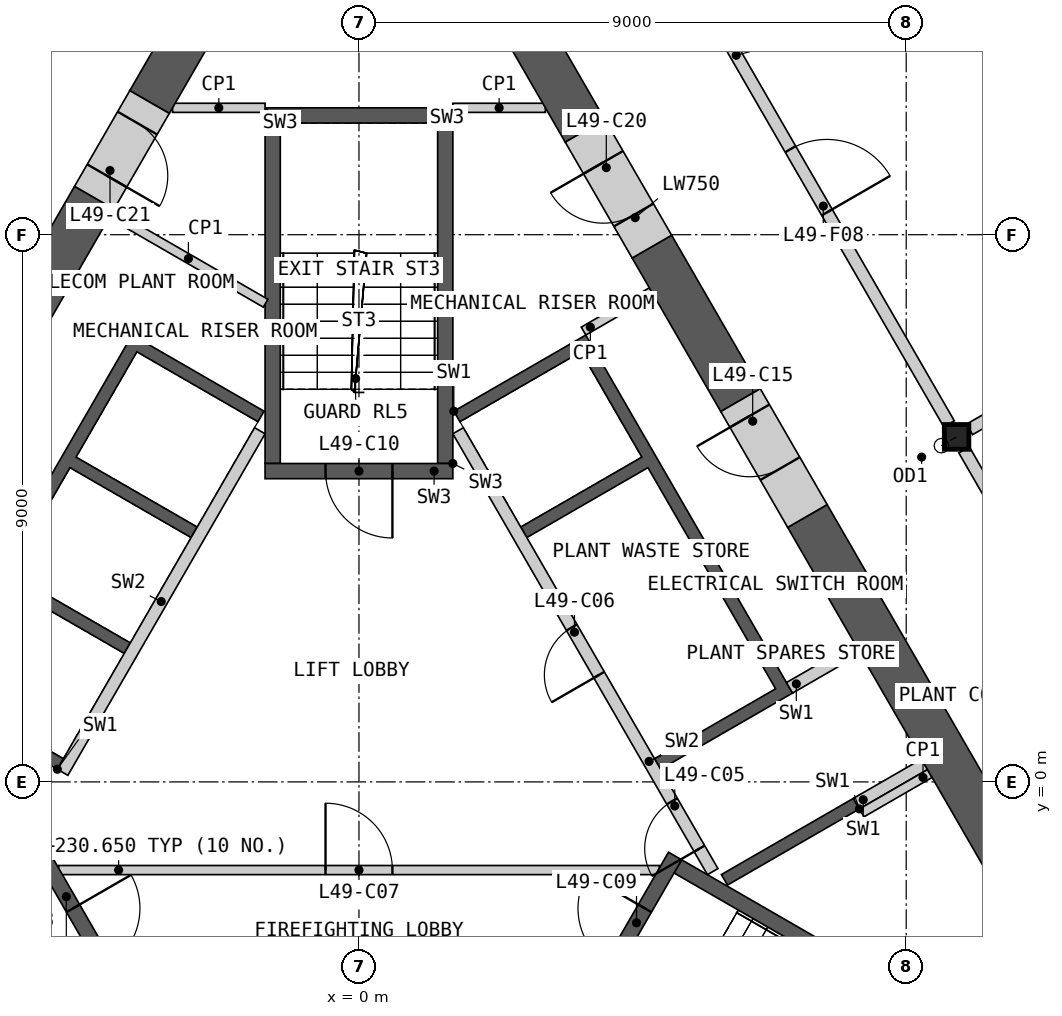
"""IFC4 building model, lengths in metres.
Left out: names, types, materials, properties, quantities, classifications, styles, units other than length and angle.
Written with IfcOpenShell. Run it as: python <this file> out.ifc"""

import sys

from ifc_helpers import new_model, si_unit, direction, frame, frame_2d, origin, origin_2d, place, context, subcontext, project, spatial, polyline, rectangle, i_section, outline, extrude, element, fill, save


model = new_model("IFC4")
c1 = context("Model", 3, precision=1e-05, world=origin(), true_north=direction((0.0, 1.0)))
c2 = subcontext(c1, "Body", "Model", "MODEL_VIEW")
j1 = project(units=[si_unit("LENGTHUNIT", "METRE"), si_unit("PLANEANGLEUNIT", "RADIAN")], contexts=[c1])
p1 = place(None, origin())
s1 = spatial("IfcSite", under=j1, at=p1, CompositionType="ELEMENT")
p2 = place(p1, origin())
s2 = spatial("IfcBuilding", under=s1, at=p2, CompositionType="ELEMENT")
p3 = place(p2, frame((0.0, 0.0, 226.0)))
s3 = spatial("IfcBuildingStorey", under=s2, at=p3, CompositionType="ELEMENT", Elevation=226.0)
p4 = place(p3, frame((9.828, 5.675, 0.0), z_axis=(-0.049916818753, -0.028858160841, 0.998336375055), x_axis=(0.500502949238, -0.865734831114, 0.0)))
e1 = element("IfcColumn", 1, at=p4, inside=s3, PredefinedType="COLUMN", context=c2, shape_type="SweptSolid", body=[
    extrude(i_section(OverallWidth=0.404, OverallDepth=0.407, WebThickness=0.027, FlangeThickness=0.044, at=origin_2d()), frame((0.0, 0.0, 0.012)), (0.0, 0.0, 1.0), 4.985),
])
p5 = place(p3, origin())
e2 = element("IfcWall", 2, at=p5, inside=s3, PredefinedType="SHEAR", context=c2, shape_type="SweptSolid", body=[
    extrude(outline(polyline([(1.561, 6.097), (3.731, 7.35), (7.131, 1.461), (4.96, 0.208), (4.861, 0.381), (6.852, 1.531), (4.752, 5.169), (2.76, 4.019), (2.66, 4.192), (4.652, 5.342), (3.652, 7.074), (1.66, 5.924), (1.561, 6.097)])), origin(), (0.0, 0.0, 1.0), 4.65),
])
p6 = place(p3, origin())
e3 = element("IfcWall", 3, at=p6, inside=s3, PredefinedType="SHEAR", context=c2, shape_type="SweptSolid", body=[
    extrude(outline(polyline([(8.231, -0.444), (6.061, -1.697), (5.96, -1.524), (8.131, -0.271), (8.231, -0.444)])), origin(), (0.0, 0.0, 1.0), 4.65),
])
p7 = place(p3, frame((5.817, -1.476, 0.0), z_axis=(0.0, 0.0, 1.0), x_axis=(-0.500002616675, 0.866023893041, 0.0)))
e4 = element("IfcWall", 4, at=p7, inside=s3, PredefinedType="SOLIDWALL", context=c2, shape_type="SweptSolid", body=[
    extrude(rectangle(XDim=8.373, YDim=0.2, at=frame_2d((4.187, 0.0))), origin(), (0.0, 0.0, 1.0), 4.65),
])
p8 = place(p7, frame((0.437, 0.0, 0.0)))
e5 = element("IfcOpeningElement", 5, at=p8, cuts=e4, PredefinedType="OPENING", context=c2, shape_type="SweptSolid", body=[
    extrude(rectangle(XDim=0.9, YDim=2.1, at=frame_2d((0.45, 1.05))), frame((0.0, 0.11, 0.0), z_axis=(0.0, -1.0, 0.0), x_axis=(1.0, 0.0, 0.0)), (0.0, 0.0, 1.0), 0.22),
])
p9 = place(p7, frame((3.737, 0.0, 0.0)))
e6 = element("IfcOpeningElement", 6, at=p9, cuts=e4, PredefinedType="OPENING", context=c2, shape_type="SweptSolid", body=[
    extrude(rectangle(XDim=0.9, YDim=2.1, at=frame_2d((0.45, 1.05))), frame((0.0, 0.11, 0.0), z_axis=(0.0, -1.0, 0.0), x_axis=(1.0, 0.0, 0.0)), (0.0, 0.0, 1.0), 0.22),
])
for number, where, z_axis, x_axis in (
    (7, (8.181, -0.357, 0.0), (0.0, 0.0, 1.0), (0.866, 0.5, 0.0)),
    (8, (7.081, 1.548, 0.0), (0.0, 0.0, 1.0), (0.866, 0.5, 0.0)),
):
    element("IfcWall", number, at=place(p3, frame(where, z_axis=z_axis, x_axis=x_axis)), inside=s3, PredefinedType="SHEAR", context=c2, shape_type="SweptSolid", body=[
        extrude(rectangle(XDim=1.293, YDim=0.2, at=frame_2d((0.646, 0.0))), origin(), (0.0, 0.0, 1.0), 4.65),
    ])
p10 = place(p3, origin())
e9 = element("IfcWall", 9, at=p10, inside=s3, PredefinedType="SHEAR", context=c2, shape_type="SweptSolid", body=[
    extrude(outline(polyline([(-4.96, 0.208), (-7.131, 1.461), (-3.731, 7.35), (-1.561, 6.097), (-1.66, 5.924), (-3.652, 7.074), (-4.652, 5.342), (-2.66, 4.192), (-2.76, 4.019), (-4.752, 5.169), (-5.752, 3.437), (-3.76, 2.287), (-3.861, 2.113), (-5.852, 3.263), (-6.852, 1.531), (-4.861, 0.381), (-4.96, 0.208)])), origin(), (0.0, 0.0, 1.0), 4.65),
])
p11 = place(p3, frame((-1.631, 5.776, 0.0), z_axis=(0.0, 0.0, 1.0), x_axis=(-0.499992876559, -0.866029516466, 0.0)))
e10 = element("IfcWall", 10, at=p11, inside=s3, PredefinedType="SOLIDWALL", context=c2, shape_type="SweptSolid", body=[
    extrude(rectangle(XDim=6.486, YDim=0.2, at=frame_2d((3.243, 0.0))), origin(), (0.0, 0.0, 1.0), 4.65),
])
p12 = place(p3, frame((-4.941, -1.45, 0.0), z_axis=(0.0, 0.0, 1.0), x_axis=(1.0, 0.0, 0.0)))
e11 = element("IfcWall", 11, at=p12, inside=s3, PredefinedType="PARTITIONING", context=c2, shape_type="SweptSolid", body=[
    extrude(rectangle(XDim=9.882, YDim=0.15, at=frame_2d((4.941, 0.0))), origin(), (0.0, 0.0, 1.0), 4.65),
])
p13 = place(p12, frame((4.391, 0.0, 0.0)))
e12 = element("IfcOpeningElement", 12, at=p13, cuts=e11, PredefinedType="OPENING", context=c2, shape_type="SweptSolid", body=[
    extrude(rectangle(XDim=1.1, YDim=2.1, at=frame_2d((0.55, 1.05))), frame((0.0, 0.085, 0.0), z_axis=(0.0, -1.0, 0.0), x_axis=(1.0, 0.0, 0.0)), (0.0, 0.0, 1.0), 0.17),
])
p14 = place(p3, frame((-5.199, -1.219, 0.0), z_axis=(0.0, 0.0, 1.0), x_axis=(0.499982516597, -0.866035497597, 0.0)))
e13 = element("IfcWall", 13, at=p14, inside=s3, PredefinedType="SHEAR", context=c2, shape_type="SweptSolid", body=[
    extrude(rectangle(XDim=3.088, YDim=0.25, at=frame_2d((1.544, 0.0))), origin(), (0.0, 0.0, 1.0), 4.65),
])
p15 = place(p14, frame((0.994, 0.0, 0.0)))
e14 = element("IfcOpeningElement", 14, at=p15, cuts=e13, PredefinedType="OPENING", context=c2, shape_type="SweptSolid", body=[
    extrude(rectangle(XDim=1.1, YDim=2.1, at=frame_2d((0.55, 1.05))), frame((0.0, 0.135, 0.0), z_axis=(0.0, -1.0, 0.0), x_axis=(1.0, 0.0, 0.0)), (0.0, 0.0, 1.0), 0.27),
])
p16 = place(p3, origin())
e15 = element("IfcWall", 15, at=p16, inside=s3, PredefinedType="SHEAR", context=c2, shape_type="SweptSolid", body=[
    extrude(outline(polyline([(10.032, -4.298), (10.374, -4.206), (5.307, -1.281), (5.182, -1.498), (10.032, -4.298)])), origin(), (0.0, 0.0, 1.0), 4.65),
])
p17 = place(p3, frame((3.655, -3.893, 0.0), z_axis=(0.0, 0.0, 1.0), x_axis=(0.499982516597, 0.866035497597, 0.0)))
e16 = element("IfcWall", 16, at=p17, inside=s3, PredefinedType="SHEAR", context=c2, shape_type="SweptSolid", body=[
    extrude(rectangle(XDim=3.088, YDim=0.25, at=frame_2d((1.544, 0.0))), origin(), (0.0, 0.0, 1.0), 4.65),
])
p18 = place(p17, frame((0.994, 0.0, 0.0)))
e17 = element("IfcOpeningElement", 17, at=p18, cuts=e16, PredefinedType="OPENING", context=c2, shape_type="SweptSolid", body=[
    extrude(rectangle(XDim=1.1, YDim=2.1, at=frame_2d((0.55, 1.05))), frame((0.0, 0.135, 0.0), z_axis=(0.0, -1.0, 0.0), x_axis=(1.0, 0.0, 0.0)), (0.0, 0.0, 1.0), 0.27),
])
p19 = place(p3, origin())
e18 = element("IfcWall", 18, at=p19, inside=s3, PredefinedType="SHEAR", context=c2, shape_type="SweptSolid", body=[
    extrude(outline(polyline([(1.544, 5.237), (1.544, 11.087), (1.294, 10.837), (1.294, 5.237), (1.544, 5.237)])), origin(), (0.0, 0.0, 1.0), 4.65),
])
p20 = place(p3, origin())
e19 = element("IfcWall", 19, at=p20, inside=s3, PredefinedType="SHEAR", context=c2, shape_type="SweptSolid", body=[
    extrude(outline(polyline([(1.544, 11.087), (-1.544, 11.087), (-1.294, 10.837), (1.294, 10.837), (1.544, 11.087)])), origin(), (0.0, 0.0, 1.0), 4.65),
])
p21 = place(p3, origin())
e20 = element("IfcWall", 20, at=p21, inside=s3, PredefinedType="SHEAR", context=c2, shape_type="SweptSolid", body=[
    extrude(outline(polyline([(-1.294, 10.837), (-1.544, 11.087), (-1.544, 5.237), (-1.294, 5.237), (-1.294, 10.837)])), origin(), (0.0, 0.0, 1.0), 4.65),
])
p22 = place(p3, frame((1.544, 5.112, 0.0), z_axis=(0.0, 0.0, 1.0), x_axis=(-1.0, 0.0, 0.0)))
e21 = element("IfcWall", 21, at=p22, inside=s3, PredefinedType="SHEAR", context=c2, shape_type="SweptSolid", body=[
    extrude(rectangle(XDim=3.088, YDim=0.25, at=frame_2d((1.544, 0.0))), origin(), (0.0, 0.0, 1.0), 4.65),
])
p23 = place(p22, frame((0.994, 0.0, 0.0)))
e22 = element("IfcOpeningElement", 22, at=p23, cuts=e21, PredefinedType="OPENING", context=c2, shape_type="SweptSolid", body=[
    extrude(rectangle(XDim=1.1, YDim=2.1, at=frame_2d((0.55, 1.05))), frame((0.0, 0.135, 0.0), z_axis=(0.0, -1.0, 0.0), x_axis=(1.0, 0.0, 0.0)), (0.0, 0.0, 1.0), 0.27),
])
for number, where, z_axis, x_axis in (
    (23, (3.693, 7.415, 0.0), (0.0, 0.0, 1.0), (0.866, 0.5, 0.0)),
    (24, (8.268, -0.509, 0.0), (0.0, 0.0, 1.0), (0.866, 0.5, 0.0)),
):
    element("IfcWall", number, at=place(p3, frame(where, z_axis=z_axis, x_axis=x_axis)), inside=s3, PredefinedType="PARTITIONING", context=c2, shape_type="SweptSolid", body=[
        extrude(rectangle(XDim=1.293, YDim=0.15, at=frame_2d((0.646, 0.0))), origin(), (0.0, 0.0, 1.0), 4.65),
    ])
p24 = place(p3, frame((-4.075, 9.339, 0.0), z_axis=(0.0, 0.0, 1.0), x_axis=(0.865995658863, -0.500051516177, 0.0)))
e25 = element("IfcWall", 25, at=p24, inside=s3, PredefinedType="PARTITIONING", context=c2, shape_type="SweptSolid", body=[
    extrude(rectangle(XDim=2.933, YDim=0.15, at=frame_2d((1.466, 0.0))), origin(), (0.0, 0.0, 1.0), 4.65),
])
for number, where, z_axis, x_axis in (
    (26, (-1.544, 11.087, 0.0), (0.0, 0.0, 1.0), (-1.0, 0.0, 0.0)),
    (27, (1.544, 11.087, 0.0), (0.0, 0.0, 1.0), (1.0, 0.0, 0.0)),
):
    element("IfcWall", number, at=place(p3, frame(where, z_axis=z_axis, x_axis=x_axis)), inside=s3, PredefinedType="PARTITIONING", context=c2, shape_type="SweptSolid", body=[
        extrude(rectangle(XDim=1.522, YDim=0.15, at=frame_2d((0.761, 0.0))), origin(), (0.0, 0.0, 1.0), 4.65),
    ])
p25 = place(p3, frame((14.526, -8.011, 0.0), z_axis=(0.0, 0.0, 1.0), x_axis=(-0.499994855372, 0.866028374016, 0.0)))
e28 = element("IfcWall", 28, at=p25, inside=s3, PredefinedType="SHEAR", context=c2, shape_type="SweptSolid", body=[
    extrude(rectangle(XDim=14.301, YDim=0.75, at=frame_2d((7.15, 0.0))), origin(), (0.0, 0.0, 1.0), 4.65),
])
p26 = place(p3, frame((6.275, 6.279, 0.0), z_axis=(0.0, 0.0, 1.0), x_axis=(-0.500029273391, 0.866008502124, 0.0)))
e29 = element("IfcWall", 29, at=p26, inside=s3, PredefinedType="SHEAR", context=c2, shape_type="SweptSolid", body=[
    extrude(rectangle(XDim=2.916, YDim=0.75, at=frame_2d((1.458, 0.0))), origin(), (0.0, 0.0, 1.0), 4.65),
])
p27 = place(p3, frame((3.717, 10.709, 0.0), z_axis=(0.0, 0.0, 1.0), x_axis=(-0.500005599468, 0.866022170906, 0.0)))
e30 = element("IfcWall", 30, at=p27, inside=s3, PredefinedType="SHEAR", context=c2, shape_type="SweptSolid", body=[
    extrude(rectangle(XDim=2.662, YDim=0.75, at=frame_2d((1.331, 0.0))), origin(), (0.0, 0.0, 1.0), 4.65),
])
p28 = place(p3, frame((-0.325, 16.585, 0.0), z_axis=(0.0, 0.0, 1.0), x_axis=(-0.499985517215, -0.866033765263, 0.0)))
e31 = element("IfcWall", 31, at=p28, inside=s3, PredefinedType="SHEAR", context=c2, shape_type="SweptSolid", body=[
    extrude(rectangle(XDim=6.24, YDim=0.75, at=frame_2d((3.12, 0.0))), origin(), (0.0, 0.0, 1.0), 4.65),
])
p29 = place(p3, frame((-4.353, 9.609, 0.0), z_axis=(0.0, 0.0, 1.0), x_axis=(-0.500017123375, -0.866015517374, 0.0)))
e32 = element("IfcWall", 32, at=p29, inside=s3, PredefinedType="SHEAR", context=c2, shape_type="SweptSolid", body=[
    extrude(rectangle(XDim=3.108, YDim=0.75, at=frame_2d((1.554, 0.0))), origin(), (0.0, 0.0, 1.0), 4.65),
])
p30 = place(p3, frame((7.375, 4.374, 0.0), z_axis=(0.0, 0.0, 1.0), x_axis=(-0.499946605688, 0.86605622881, 0.0)))
e33 = element("IfcWall", 33, at=p30, inside=s3, PredefinedType="SHEAR", context=c2, shape_type="SweptSolid", body=[
    extrude(rectangle(XDim=2.2, YDim=0.75, at=frame_2d((1.1, 0.0))), origin(), (0.0, 0.0, 1.0), 4.65),
])
p31 = place(p30, frame((0.9, 0.0, 0.0)))
e34 = element("IfcOpeningElement", 34, at=p31, cuts=e33, PredefinedType="OPENING", context=c2, shape_type="SweptSolid", body=[
    extrude(rectangle(XDim=1.0, YDim=2.1, at=frame_2d((0.5, 1.05))), frame((0.0, 0.385, 0.0), z_axis=(0.0, -1.0, 0.0), x_axis=(1.0, 0.0, 0.0)), (0.0, 0.0, 1.0), 0.77),
])
p32 = place(p3, frame((4.817, 8.804, 0.0), z_axis=(0.0, 0.0, 1.0), x_axis=(-0.50002983664, 0.866008176907, 0.0)))
e35 = element("IfcWall", 35, at=p32, inside=s3, PredefinedType="SHEAR", context=c2, shape_type="SweptSolid", body=[
    extrude(rectangle(XDim=2.2, YDim=0.75, at=frame_2d((1.1, 0.0))), origin(), (0.0, 0.0, 1.0), 4.65),
])
p33 = place(p32, frame((0.6, 0.0, 0.0)))
e36 = element("IfcOpeningElement", 36, at=p33, cuts=e35, PredefinedType="OPENING", context=c2, shape_type="SweptSolid", body=[
    extrude(rectangle(XDim=1.0, YDim=2.1, at=frame_2d((0.5, 1.05))), frame((0.0, 0.385, 0.0), z_axis=(0.0, -1.0, 0.0), x_axis=(1.0, 0.0, 0.0)), (0.0, 0.0, 1.0), 0.77),
])
p34 = place(p3, frame((-3.444, 11.182, 0.0), z_axis=(0.0, 0.0, 1.0), x_axis=(-0.500071537347, -0.865984097738, 0.0)))
e37 = element("IfcWall", 37, at=p34, inside=s3, PredefinedType="SHEAR", context=c2, shape_type="SweptSolid", body=[
    extrude(rectangle(XDim=1.816, YDim=0.75, at=frame_2d((0.908, 0.0))), origin(), (0.0, 0.0, 1.0), 4.65),
])
p35 = place(p34, frame((0.4, 0.0, 0.0)))
e38 = element("IfcOpeningElement", 38, at=p35, cuts=e37, PredefinedType="OPENING", context=c2, shape_type="SweptSolid", body=[
    extrude(rectangle(XDim=1.0, YDim=2.1, at=frame_2d((0.5, 1.05))), frame((0.0, 0.385, 0.0), z_axis=(0.0, -1.0, 0.0), x_axis=(1.0, 0.0, 0.0)), (0.0, 0.0, 1.0), 0.77),
])
p36 = place(p3, frame((-9.705, 5.888, 0.0), z_axis=(0.0, 0.0, 1.0), x_axis=(0.50000393355, 0.866023132736, 0.0)))
e39 = element("IfcWall", 39, at=p36, inside=s3, PredefinedType="PARTITIONING", context=c2, shape_type="SweptSolid", body=[
    extrude(rectangle(XDim=9.335, YDim=0.2, at=frame_2d((4.667, 0.0))), origin(), (0.0, 0.0, 1.0), 4.65),
])
p37 = place(p36, frame((4.017, 0.0, 0.0)))
e40 = element("IfcOpeningElement", 40, at=p37, cuts=e39, PredefinedType="OPENING", context=c2, shape_type="SweptSolid", body=[
    extrude(rectangle(XDim=1.2, YDim=2.1, at=frame_2d((0.6, 1.05))), frame((0.0, 0.11, 0.0), z_axis=(0.0, -1.0, 0.0), x_axis=(1.0, 0.0, 0.0)), (0.0, 0.0, 1.0), 0.22),
])
p38 = place(p3, frame((5.038, 13.972, 0.0), z_axis=(0.0, 0.0, 1.0), x_axis=(0.50000393355, -0.866023132736, 0.0)))
e41 = element("IfcWall", 41, at=p38, inside=s3, PredefinedType="PARTITIONING", context=c2, shape_type="SweptSolid", body=[
    extrude(rectangle(XDim=9.335, YDim=0.2, at=frame_2d((4.667, 0.0))), origin(), (0.0, 0.0, 1.0), 4.65),
])
p39 = place(p38, frame((4.118, 0.0, 0.0)))
e42 = element("IfcOpeningElement", 42, at=p39, cuts=e41, PredefinedType="OPENING", context=c2, shape_type="SweptSolid", body=[
    extrude(rectangle(XDim=1.2, YDim=2.1, at=frame_2d((0.6, 1.05))), frame((0.0, 0.11, 0.0), z_axis=(0.0, -1.0, 0.0), x_axis=(1.0, 0.0, 0.0)), (0.0, 0.0, 1.0), 0.22),
])
p40 = place(p3, frame((9.952, 5.461, 0.0), z_axis=(0.0, 0.0, 1.0), x_axis=(0.50000393355, -0.866023132736, 0.0)))
e43 = element("IfcWall", 43, at=p40, inside=s3, PredefinedType="PARTITIONING", context=c2, shape_type="SweptSolid", body=[
    extrude(rectangle(XDim=9.335, YDim=0.2, at=frame_2d((4.667, 0.0))), origin(), (0.0, 0.0, 1.0), 4.65),
])
p41 = place(p40, frame((4.017, 0.0, 0.0)))
e44 = element("IfcOpeningElement", 44, at=p41, cuts=e43, PredefinedType="OPENING", context=c2, shape_type="SweptSolid", body=[
    extrude(rectangle(XDim=1.2, YDim=2.1, at=frame_2d((0.6, 1.05))), frame((0.0, 0.11, 0.0), z_axis=(0.0, -1.0, 0.0), x_axis=(1.0, 0.0, 0.0)), (0.0, 0.0, 1.0), 0.22),
])
p42 = place(p3, frame((10.042, 5.798, 0.0), z_axis=(0.0, 0.0, 1.0), x_axis=(0.866025883649, 0.499999168849, 0.0)))
e45 = element("IfcWall", 45, at=p42, inside=s3, PredefinedType="PARTITIONING", context=c2, shape_type="SweptSolid", body=[
    extrude(rectangle(XDim=12.652, YDim=0.2, at=frame_2d((6.326, 0.0))), origin(), (0.0, 0.0, 1.0), 4.65),
])
p43 = place(p8, origin())
e46 = element("IfcDoor", 46, at=p43, inside=s3, OperationType="SINGLE_SWING_LEFT", PredefinedType="DOOR", context=c2, shape_type="SweptSolid", body=[
    extrude(rectangle(XDim=0.9, YDim=2.1, at=frame_2d((0.45, 1.05))), frame((0.0, 0.025, 0.0), z_axis=(0.0, -1.0, 0.0), x_axis=(1.0, 0.0, 0.0)), (0.0, 0.0, 1.0), 0.05),
])
fill(e5, e46)
p44 = place(p9, origin())
e47 = element("IfcDoor", 47, at=p44, inside=s3, OperationType="SINGLE_SWING_LEFT", PredefinedType="DOOR", context=c2, shape_type="SweptSolid", body=[
    extrude(rectangle(XDim=0.9, YDim=2.1, at=frame_2d((0.45, 1.05))), frame((0.0, 0.025, 0.0), z_axis=(0.0, -1.0, 0.0), x_axis=(1.0, 0.0, 0.0)), (0.0, 0.0, 1.0), 0.05),
])
fill(e6, e47)
p45 = place(p13, origin())
e48 = element("IfcDoor", 48, at=p45, inside=s3, OperationType="SINGLE_SWING_LEFT", PredefinedType="DOOR", context=c2, shape_type="SweptSolid", body=[
    extrude(rectangle(XDim=1.1, YDim=2.1, at=frame_2d((0.55, 1.05))), frame((0.0, 0.025, 0.0), z_axis=(0.0, -1.0, 0.0), x_axis=(1.0, 0.0, 0.0)), (0.0, 0.0, 1.0), 0.05),
])
fill(e12, e48)
p46 = place(p15, origin())
e49 = element("IfcDoor", 49, at=p46, inside=s3, OperationType="SINGLE_SWING_LEFT", PredefinedType="DOOR", context=c2, shape_type="SweptSolid", body=[
    extrude(rectangle(XDim=1.1, YDim=2.1, at=frame_2d((0.55, 1.05))), frame((0.0, 0.025, 0.0), z_axis=(0.0, -1.0, 0.0), x_axis=(1.0, 0.0, 0.0)), (0.0, 0.0, 1.0), 0.05),
])
fill(e14, e49)
p47 = place(p18, origin())
e50 = element("IfcDoor", 50, at=p47, inside=s3, OperationType="SINGLE_SWING_RIGHT", PredefinedType="DOOR", context=c2, shape_type="SweptSolid", body=[
    extrude(rectangle(XDim=1.1, YDim=2.1, at=frame_2d((0.55, 1.05))), frame((0.0, 0.025, 0.0), z_axis=(0.0, -1.0, 0.0), x_axis=(1.0, 0.0, 0.0)), (0.0, 0.0, 1.0), 0.05),
])
fill(e17, e50)
p48 = place(p23, origin())
e51 = element("IfcDoor", 51, at=p48, inside=s3, OperationType="SINGLE_SWING_LEFT", PredefinedType="DOOR", context=c2, shape_type="SweptSolid", body=[
    extrude(rectangle(XDim=1.1, YDim=2.1, at=frame_2d((0.55, 1.05))), frame((0.0, 0.025, 0.0), z_axis=(0.0, -1.0, 0.0), x_axis=(1.0, 0.0, 0.0)), (0.0, 0.0, 1.0), 0.05),
])
fill(e22, e51)
p49 = place(p31, origin())
e52 = element("IfcDoor", 52, at=p49, inside=s3, OperationType="SINGLE_SWING_RIGHT", PredefinedType="DOOR", context=c2, shape_type="SweptSolid", body=[
    extrude(rectangle(XDim=1.0, YDim=2.1, at=frame_2d((0.5, 1.05))), frame((0.0, 0.13, 0.0), z_axis=(0.0, -1.0, 0.0), x_axis=(1.0, 0.0, 0.0)), (0.0, 0.0, 1.0), 0.05),
])
fill(e34, e52)
p50 = place(p33, origin())
e53 = element("IfcDoor", 53, at=p50, inside=s3, OperationType="SINGLE_SWING_RIGHT", PredefinedType="DOOR", context=c2, shape_type="SweptSolid", body=[
    extrude(rectangle(XDim=1.0, YDim=2.1, at=frame_2d((0.5, 1.05))), frame((0.0, 0.13, 0.0), z_axis=(0.0, -1.0, 0.0), x_axis=(1.0, 0.0, 0.0)), (0.0, 0.0, 1.0), 0.05),
])
fill(e36, e53)
p51 = place(p35, origin())
e54 = element("IfcDoor", 54, at=p51, inside=s3, OperationType="SINGLE_SWING_RIGHT", PredefinedType="DOOR", context=c2, shape_type="SweptSolid", body=[
    extrude(rectangle(XDim=1.0, YDim=2.1, at=frame_2d((0.5, 1.05))), frame((0.0, 0.13, 0.0), z_axis=(0.0, -1.0, 0.0), x_axis=(1.0, 0.0, 0.0)), (0.0, 0.0, 1.0), 0.05),
])
fill(e38, e54)
p52 = place(p39, origin())
e55 = element("IfcDoor", 55, at=p52, inside=s3, OperationType="SINGLE_SWING_RIGHT", PredefinedType="DOOR", context=c2, shape_type="SweptSolid", body=[
    extrude(rectangle(XDim=1.2, YDim=2.1, at=frame_2d((0.6, 1.05))), frame((0.0, 0.025, 0.0), z_axis=(0.0, -1.0, 0.0), x_axis=(1.0, 0.0, 0.0)), (0.0, 0.0, 1.0), 0.05),
])
fill(e42, e55)
save(model, sys.argv[1])
